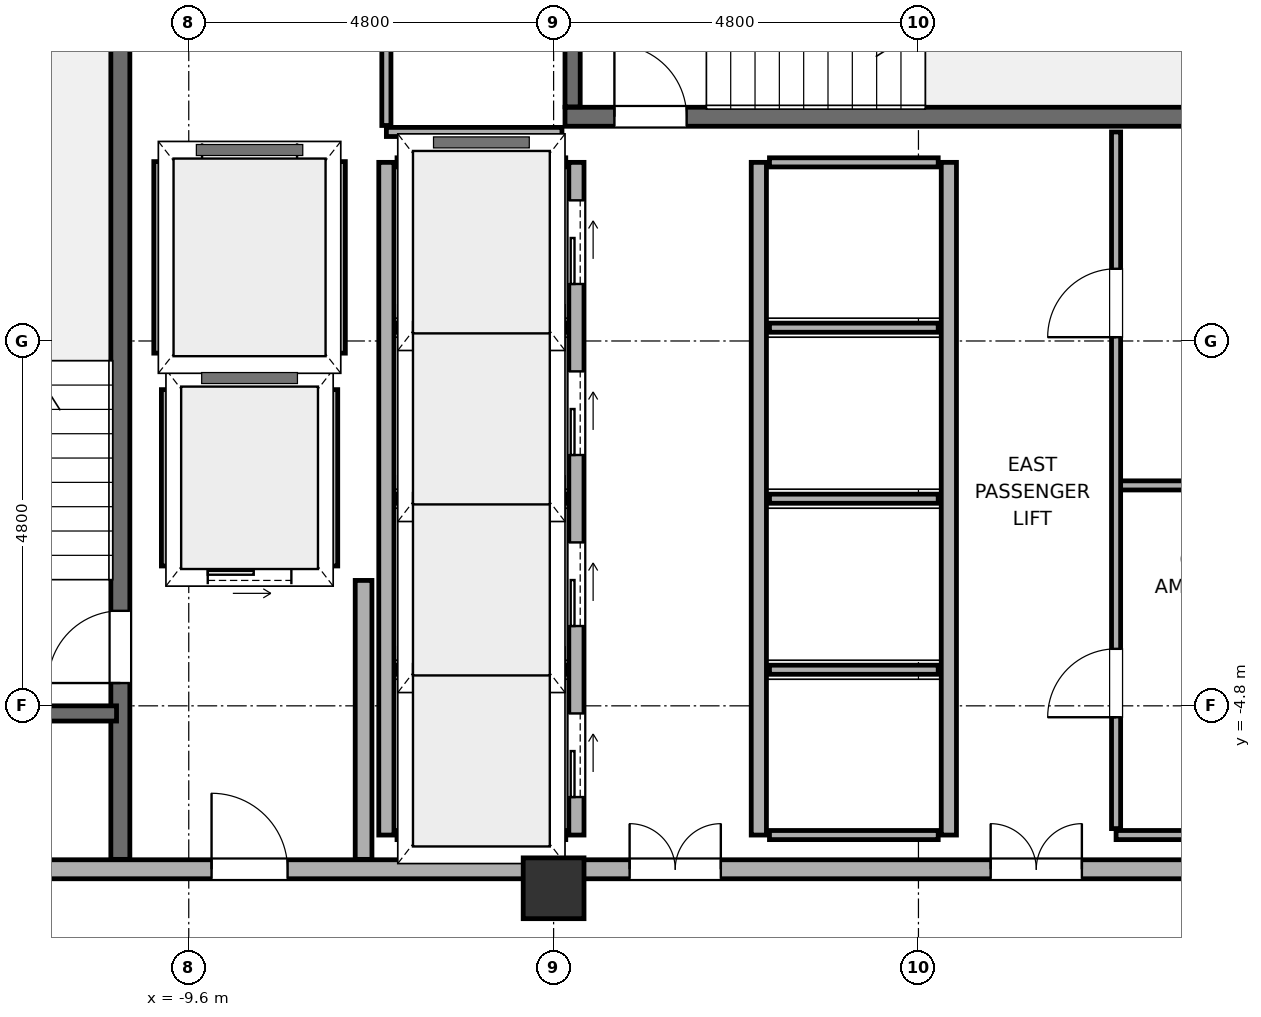
"""IFC4 building model, lengths in metres.
Left out: names, types, materials, properties, quantities, classifications, styles, units other than length and angle.
Written with IfcOpenShell. Run it as: python <this file> out.ifc"""

import sys

from ifc_helpers import new_model, si_unit, direction, frame, frame_2d, origin, origin_2d, place, context, subcontext, project, spatial, rectangle, hollow_rectangle, extrude, element, fill, save


model = new_model("IFC4")
c1 = context("Model", 3, precision=1e-05, world=origin(), true_north=direction((0.0, 1.0)))
c2 = subcontext(c1, "Body", "Model", "MODEL_VIEW")
j1 = project(units=[si_unit("LENGTHUNIT", "METRE"), si_unit("PLANEANGLEUNIT", "RADIAN")], contexts=[c1])
p1 = place(None, origin())
s1 = spatial("IfcSite", under=j1, at=p1, CompositionType="ELEMENT")
p2 = place(p1, origin())
s2 = spatial("IfcBuilding", under=s1, at=p2, CompositionType="ELEMENT")
p3 = place(p2, frame((0.0, 0.0, 30.0)))
s3 = spatial("IfcBuildingStorey", under=s2, at=p3, CompositionType="ELEMENT", Elevation=30.0)
p4 = place(p3, frame((-4.8, -7.2, 0.0), z_axis=(0.0, 0.0, 1.0), x_axis=(1.0, 0.0, 0.0)))
e1 = element("IfcColumn", 1, at=p4, inside=s3, PredefinedType="COLUMN", context=c2, shape_type="SweptSolid", body=[
    extrude(hollow_rectangle(XDim=0.8, YDim=0.8, WallThickness=0.036, at=origin_2d()), origin(), (0.0, 0.0, 1.0), 3.7),
])
p5 = place(p3, frame((-14.2, -6.95, 0.0), z_axis=(0.0, 0.0, 1.0), x_axis=(1.0, 0.0, 0.0)))
e2 = element("IfcWall", 2, at=p5, inside=s3, PredefinedType="SOLIDWALL", context=c2, shape_type="SweptSolid", body=[
    extrude(rectangle(XDim=9.4, YDim=0.25, at=frame_2d((4.7, 0.0))), origin(), (0.0, 0.0, 1.0), 2.12),
])
p6 = place(p5, frame((4.9, 0.0, 0.0)))
e3 = element("IfcOpeningElement", 3, at=p6, cuts=e2, PredefinedType="OPENING", context=c2, shape_type="SweptSolid", body=[
    extrude(rectangle(XDim=1.0, YDim=2.02, at=frame_2d((0.5, 1.01))), frame((0.0, 0.14, 0.0), z_axis=(0.0, -1.0, 0.0), x_axis=(1.0, 0.0, 0.0)), (0.0, 0.0, 1.0), 0.28),
])
p7 = place(p3, frame((-4.6, -6.95, 0.0), z_axis=(0.0, 0.0, 1.0), x_axis=(1.0, 0.0, 0.0)))
e4 = element("IfcWall", 4, at=p7, inside=s3, PredefinedType="SOLIDWALL", context=c2, shape_type="SweptSolid", body=[
    extrude(rectangle(XDim=9.2, YDim=0.25, at=frame_2d((4.6, 0.0))), origin(), (0.0, 0.0, 1.0), 2.32),
])
p8 = place(p7, frame((0.8, 0.0, 0.0)))
e5 = element("IfcOpeningElement", 5, at=p8, cuts=e4, PredefinedType="OPENING", context=c2, shape_type="SweptSolid", body=[
    extrude(rectangle(XDim=1.2, YDim=2.2, at=frame_2d((0.6, 1.1))), frame((0.0, 0.14, 0.0), z_axis=(0.0, -1.0, 0.0), x_axis=(1.0, 0.0, 0.0)), (0.0, 0.0, 1.0), 0.28),
])
p9 = place(p7, frame((5.55, 0.0, 0.0)))
e6 = element("IfcOpeningElement", 6, at=p9, cuts=e4, PredefinedType="OPENING", context=c2, shape_type="SweptSolid", body=[
    extrude(rectangle(XDim=1.2, YDim=2.2, at=frame_2d((0.6, 1.1))), frame((0.0, 0.14, 0.0), z_axis=(0.0, -1.0, 0.0), x_axis=(1.0, 0.0, 0.0)), (0.0, 0.0, 1.0), 0.28),
])
p10 = place(p3, frame((-7.3, -6.82, 0.0), z_axis=(0.0, 0.0, 1.0), x_axis=(0.0, 1.0, 0.0)))
e7 = element("IfcWall", 7, at=p10, inside=s3, PredefinedType="SOLIDWALL", context=c2, shape_type="SweptSolid", body=[
    extrude(rectangle(XDim=3.67, YDim=0.22, at=frame_2d((1.835, 0.0))), origin(), (0.0, 0.0, 1.0), 2.12),
])
p11 = place(p3, frame((-10.5, -6.82, -0.18), z_axis=(0.0, 0.0, 1.0), x_axis=(0.0, 1.0, 0.0)))
e8 = element("IfcWall", 8, at=p11, inside=s3, PredefinedType="SOLIDWALL", context=c2, shape_type="SweptSolid", body=[
    extrude(rectangle(XDim=13.64, YDim=0.25, at=frame_2d((6.82, 0.0))), origin(), (0.0, 0.0, 1.0), 3.7),
])
p12 = place(p11, frame((2.32, 0.0, 0.18)))
e9 = element("IfcOpeningElement", 9, at=p12, cuts=e8, PredefinedType="OPENING", context=c2, shape_type="SweptSolid", body=[
    extrude(rectangle(XDim=0.95, YDim=2.15, at=frame_2d((0.475, 1.075))), frame((0.0, 0.14, 0.0), z_axis=(0.0, -1.0, 0.0), x_axis=(1.0, 0.0, 0.0)), (0.0, 0.0, 1.0), 0.28),
])
p13 = place(p3, frame((-14.2, -4.9, -0.18), z_axis=(0.0, 0.0, 1.0), x_axis=(1.0, 0.0, 0.0)))
e10 = element("IfcWall", 10, at=p13, inside=s3, PredefinedType="SOLIDWALL", context=c2, shape_type="SweptSolid", body=[
    extrude(rectangle(XDim=3.65, YDim=0.2, at=frame_2d((1.825, 0.0))), origin(), (0.0, 0.0, 1.0), 3.7),
])
p14 = place(p3, frame((-4.65, 2.95, -0.18), z_axis=(0.0, 0.0, 1.0), x_axis=(1.0, 0.0, 0.0)))
e11 = element("IfcWall", 11, at=p14, inside=s3, PredefinedType="SOLIDWALL", context=c2, shape_type="SweptSolid", body=[
    extrude(rectangle(XDim=9.9, YDim=0.25, at=frame_2d((4.95, 0.0))), origin(), (0.0, 0.0, 1.0), 3.7),
])
p15 = place(p14, frame((0.65, 0.0, 0.18)))
e12 = element("IfcOpeningElement", 12, at=p15, cuts=e11, PredefinedType="OPENING", context=c2, shape_type="SweptSolid", body=[
    extrude(rectangle(XDim=0.95, YDim=2.15, at=frame_2d((0.475, 1.075))), frame((0.0, 0.14, 0.0), z_axis=(0.0, -1.0, 0.0), x_axis=(1.0, 0.0, 0.0)), (0.0, 0.0, 1.0), 0.28),
])
p16 = place(p3, frame((-4.55, 3.08, -0.18), z_axis=(0.0, 0.0, 1.0), x_axis=(0.0, 1.0, 0.0)))
e13 = element("IfcWall", 13, at=p16, inside=s3, PredefinedType="SOLIDWALL", context=c2, shape_type="SweptSolid", body=[
    extrude(rectangle(XDim=3.74, YDim=0.2, at=frame_2d((1.87, 0.0))), origin(), (0.0, 0.0, 1.0), 3.7),
])
p17 = place(p3, frame((-4.5, -6.5, 0.0), z_axis=(0.0, 0.0, 1.0), x_axis=(0.0, 1.0, 0.0)))
e14 = element("IfcWall", 14, at=p17, inside=s3, PredefinedType="SOLIDWALL", context=c2, shape_type="SweptSolid", body=[
    extrude(rectangle(XDim=8.85, YDim=0.2, at=frame_2d((4.425, 0.0))), origin(), (0.0, 0.0, 1.0), 3.52),
])
p18 = place(p17, frame((0.5, 0.0, 0.0)))
e15 = element("IfcOpeningElement", 15, at=p18, cuts=e14, PredefinedType="OPENING", context=c2, shape_type="SweptSolid", body=[
    extrude(rectangle(XDim=1.1, YDim=2.2, at=frame_2d((0.55, 1.1))), frame((0.0, 0.115, 0.0), z_axis=(0.0, -1.0, 0.0), x_axis=(1.0, 0.0, 0.0)), (0.0, 0.0, 1.0), 0.23),
])
p19 = place(p17, frame((2.75, 0.0, 0.0)))
e16 = element("IfcOpeningElement", 16, at=p19, cuts=e14, PredefinedType="OPENING", context=c2, shape_type="SweptSolid", body=[
    extrude(rectangle(XDim=1.1, YDim=2.2, at=frame_2d((0.55, 1.1))), frame((0.0, 0.115, 0.0), z_axis=(0.0, -1.0, 0.0), x_axis=(1.0, 0.0, 0.0)), (0.0, 0.0, 1.0), 0.23),
])
p20 = place(p17, frame((5.0, 0.0, 0.0)))
e17 = element("IfcOpeningElement", 17, at=p20, cuts=e14, PredefinedType="OPENING", context=c2, shape_type="SweptSolid", body=[
    extrude(rectangle(XDim=1.1, YDim=2.2, at=frame_2d((0.55, 1.1))), frame((0.0, 0.115, 0.0), z_axis=(0.0, -1.0, 0.0), x_axis=(1.0, 0.0, 0.0)), (0.0, 0.0, 1.0), 0.23),
])
p21 = place(p17, frame((7.25, 0.0, 0.0)))
e18 = element("IfcOpeningElement", 18, at=p21, cuts=e14, PredefinedType="OPENING", context=c2, shape_type="SweptSolid", body=[
    extrude(rectangle(XDim=1.1, YDim=2.2, at=frame_2d((0.55, 1.1))), frame((0.0, 0.115, 0.0), z_axis=(0.0, -1.0, 0.0), x_axis=(1.0, 0.0, 0.0)), (0.0, 0.0, 1.0), 0.23),
])
p22 = place(p3, frame((-7.0, -6.5, 0.0), z_axis=(0.0, 0.0, 1.0), x_axis=(0.0, 1.0, 0.0)))
e19 = element("IfcWall", 19, at=p22, inside=s3, PredefinedType="SOLIDWALL", context=c2, shape_type="SweptSolid", body=[
    extrude(rectangle(XDim=8.85, YDim=0.2, at=frame_2d((4.425, 0.0))), origin(), (0.0, 0.0, 1.0), 3.52),
])
for number, where, z_axis, x_axis in (
    (20, (-6.86, -6.5, 0.0), (0.0, 0.0, 1.0), (1.0, 0.0, 0.0)),
    (21, (-6.86, -4.325, 0.0), (0.0, 0.0, 1.0), (1.0, 0.0, 0.0)),
    (22, (-6.86, -2.075, 0.0), (0.0, 0.0, 1.0), (1.0, 0.0, 0.0)),
    (23, (-6.86, 0.175, 0.0), (0.0, 0.0, 1.0), (1.0, 0.0, 0.0)),
    (24, (-6.86, 2.35, 0.0), (0.0, 0.0, 1.0), (1.0, 0.0, 0.0)),
):
    element("IfcWall", number, at=place(p3, frame(where, z_axis=z_axis, x_axis=x_axis)), inside=s3, PredefinedType="PARTITIONING", context=c2, shape_type="SweptSolid", body=[
        extrude(rectangle(XDim=2.22, YDim=0.12, at=frame_2d((1.11, 0.0))), origin(), (0.0, 0.0, 1.0), 3.52),
    ])
for number, where, z_axis, x_axis in (
    (25, (-2.1, -6.5, 0.0), (0.0, 0.0, 1.0), (0.0, 1.0, 0.0)),
    (26, (0.4, -6.5, 0.0), (0.0, 0.0, 1.0), (0.0, 1.0, 0.0)),
):
    element("IfcWall", number, at=place(p3, frame(where, z_axis=z_axis, x_axis=x_axis)), inside=s3, PredefinedType="SOLIDWALL", context=c2, shape_type="SweptSolid", body=[
        extrude(rectangle(XDim=8.85, YDim=0.2, at=frame_2d((4.425, 0.0))), origin(), (0.0, 0.0, 1.0), 3.52),
    ])
for number, where, z_axis, x_axis in (
    (27, (-1.96, -6.5, 0.0), (0.0, 0.0, 1.0), (1.0, 0.0, 0.0)),
    (28, (-1.96, -4.325, 0.0), (0.0, 0.0, 1.0), (1.0, 0.0, 0.0)),
    (29, (-1.96, -2.075, 0.0), (0.0, 0.0, 1.0), (1.0, 0.0, 0.0)),
    (30, (-1.96, 0.175, 0.0), (0.0, 0.0, 1.0), (1.0, 0.0, 0.0)),
    (31, (-1.96, 2.35, 0.0), (0.0, 0.0, 1.0), (1.0, 0.0, 0.0)),
):
    element("IfcWall", number, at=place(p3, frame(where, z_axis=z_axis, x_axis=x_axis)), inside=s3, PredefinedType="PARTITIONING", context=c2, shape_type="SweptSolid", body=[
        extrude(rectangle(XDim=2.22, YDim=0.12, at=frame_2d((1.11, 0.0))), origin(), (0.0, 0.0, 1.0), 3.52),
    ])
p23 = place(p3, frame((-9.82, -3.1, 0.0), z_axis=(0.0, 0.0, 1.0), x_axis=(1.0, 0.0, 0.0)))
e32 = element("IfcWall", 32, at=p23, inside=s3, PredefinedType="SOLIDWALL", context=c2, shape_type="SweptSolid", body=[
    extrude(rectangle(XDim=2.04, YDim=0.2, at=frame_2d((1.02, 0.0))), origin(), (0.0, 0.0, 1.0), 3.52),
])
p24 = place(p23, frame((0.47, 0.0, 0.0)))
e33 = element("IfcOpeningElement", 33, at=p24, cuts=e32, PredefinedType="OPENING", context=c2, shape_type="SweptSolid", body=[
    extrude(rectangle(XDim=1.1, YDim=2.2, at=frame_2d((0.55, 1.1))), frame((0.0, 0.115, 0.0), z_axis=(0.0, -1.0, 0.0), x_axis=(1.0, 0.0, 0.0)), (0.0, 0.0, 1.0), 0.23),
])
p25 = place(p3, frame((-9.82, -0.5, 0.0), z_axis=(0.0, 0.0, 1.0), x_axis=(1.0, 0.0, 0.0)))
e34 = element("IfcWall", 34, at=p25, inside=s3, PredefinedType="SOLIDWALL", context=c2, shape_type="SweptSolid", body=[
    extrude(rectangle(XDim=2.04, YDim=0.2, at=frame_2d((1.02, 0.0))), origin(), (0.0, 0.0, 1.0), 3.52),
])
for number, where, z_axis, x_axis in (
    (35, (-9.9, -2.96, 0.0), (0.0, 0.0, 1.0), (0.0, 1.0, 0.0)),
    (36, (-7.7, -2.96, 0.0), (0.0, 0.0, 1.0), (0.0, 1.0, 0.0)),
):
    element("IfcWall", number, at=place(p3, frame(where, z_axis=z_axis, x_axis=x_axis)), inside=s3, PredefinedType="PARTITIONING", context=c2, shape_type="SweptSolid", body=[
        extrude(rectangle(XDim=2.32, YDim=0.12, at=frame_2d((1.16, 0.0))), origin(), (0.0, 0.0, 1.0), 3.52),
    ])
p26 = place(p3, frame((-9.92, 2.5, 0.0), z_axis=(0.0, 0.0, 1.0), x_axis=(1.0, 0.0, 0.0)))
e37 = element("IfcWall", 37, at=p26, inside=s3, PredefinedType="SOLIDWALL", context=c2, shape_type="SweptSolid", body=[
    extrude(rectangle(XDim=2.24, YDim=0.2, at=frame_2d((1.12, 0.0))), origin(), (0.0, 0.0, 1.0), 3.52),
])
p27 = place(p26, frame((0.495, 0.0, 0.0)))
e38 = element("IfcOpeningElement", 38, at=p27, cuts=e37, PredefinedType="OPENING", context=c2, shape_type="SweptSolid", body=[
    extrude(rectangle(XDim=1.25, YDim=2.25, at=frame_2d((0.625, 1.125))), frame((0.0, 0.115, 0.0), z_axis=(0.0, -1.0, 0.0), x_axis=(1.0, 0.0, 0.0)), (0.0, 0.0, 1.0), 0.23),
])
p28 = place(p3, frame((-9.92, -0.3, 0.0), z_axis=(0.0, 0.0, 1.0), x_axis=(1.0, 0.0, 0.0)))
e39 = element("IfcWall", 39, at=p28, inside=s3, PredefinedType="SOLIDWALL", context=c2, shape_type="SweptSolid", body=[
    extrude(rectangle(XDim=2.24, YDim=0.2, at=frame_2d((1.12, 0.0))), origin(), (0.0, 0.0, 1.0), 3.52),
])
for number, where, z_axis, x_axis in (
    (40, (-10.0, -0.16, 0.0), (0.0, 0.0, 1.0), (0.0, 1.0, 0.0)),
    (41, (-7.6, -0.16, 0.0), (0.0, 0.0, 1.0), (0.0, 1.0, 0.0)),
):
    element("IfcWall", number, at=place(p3, frame(where, z_axis=z_axis, x_axis=x_axis)), inside=s3, PredefinedType="PARTITIONING", context=c2, shape_type="SweptSolid", body=[
        extrude(rectangle(XDim=2.52, YDim=0.12, at=frame_2d((1.26, 0.0))), origin(), (0.0, 0.0, 1.0), 3.52),
    ])
for number, where, z_axis, x_axis in (
    (42, (2.6, -6.5, 0.0), (0.0, 0.0, 1.0), (1.0, 0.0, 0.0)),
    (43, (2.6, -1.9, 0.0), (0.0, 0.0, 1.0), (1.0, 0.0, 0.0)),
):
    element("IfcWall", number, at=place(p3, frame(where, z_axis=z_axis, x_axis=x_axis)), inside=s3, PredefinedType="PARTITIONING", context=c2, shape_type="SweptSolid", body=[
        extrude(rectangle(XDim=2.45, YDim=0.12, at=frame_2d((1.225, 0.0))), origin(), (0.0, 0.0, 1.0), 3.52),
    ])
p29 = place(p3, frame((-7.0, 2.75, 0.0), z_axis=(0.0, 0.0, 1.0), x_axis=(1.0, 0.0, 0.0)))
e44 = element("IfcWall", 44, at=p29, inside=s3, PredefinedType="PARTITIONING", context=c2, shape_type="SweptSolid", body=[
    extrude(rectangle(XDim=2.31, YDim=0.12, at=frame_2d((1.155, 0.0))), origin(), (0.0, 0.0, 1.0), 3.52),
])
p30 = place(p3, frame((-7.0, 2.835, 0.0), z_axis=(0.0, 0.0, 1.0), x_axis=(0.0, 1.0, 0.0)))
e45 = element("IfcWall", 45, at=p30, inside=s3, PredefinedType="PARTITIONING", context=c2, shape_type="SweptSolid", body=[
    extrude(rectangle(XDim=3.715, YDim=0.12, at=frame_2d((1.857, 0.0))), origin(), (0.0, 0.0, 1.0), 3.52),
])
p31 = place(p30, frame((1.315, 0.0, 0.0)))
e46 = element("IfcOpeningElement", 46, at=p31, cuts=e45, PredefinedType="OPENING", context=c2, shape_type="SweptSolid", body=[
    extrude(rectangle(XDim=0.9, YDim=2.1, at=frame_2d((0.45, 1.05))), frame((0.0, 0.075, 0.0), z_axis=(0.0, -1.0, 0.0), x_axis=(1.0, 0.0, 0.0)), (0.0, 0.0, 1.0), 0.15),
])
p32 = place(p3, frame((2.6, -6.415, 0.0), z_axis=(0.0, 0.0, 1.0), x_axis=(0.0, 1.0, 0.0)))
e47 = element("IfcWall", 47, at=p32, inside=s3, PredefinedType="PARTITIONING", context=c2, shape_type="SweptSolid", body=[
    extrude(rectangle(XDim=9.165, YDim=0.12, at=frame_2d((4.583, 0.0))), origin(), (0.0, 0.0, 1.0), 3.52),
])
p33 = place(p32, frame((1.465, 0.0, 0.0)))
e48 = element("IfcOpeningElement", 48, at=p33, cuts=e47, PredefinedType="OPENING", context=c2, shape_type="SweptSolid", body=[
    extrude(rectangle(XDim=0.9, YDim=2.1, at=frame_2d((0.45, 1.05))), frame((0.0, 0.075, 0.0), z_axis=(0.0, -1.0, 0.0), x_axis=(1.0, 0.0, 0.0)), (0.0, 0.0, 1.0), 0.15),
])
p34 = place(p32, frame((6.465, 0.0, 0.0)))
e49 = element("IfcOpeningElement", 49, at=p34, cuts=e47, PredefinedType="OPENING", context=c2, shape_type="SweptSolid", body=[
    extrude(rectangle(XDim=0.9, YDim=2.1, at=frame_2d((0.45, 1.05))), frame((0.0, 0.075, 0.0), z_axis=(0.0, -1.0, 0.0), x_axis=(1.0, 0.0, 0.0)), (0.0, 0.0, 1.0), 0.15),
])
p35 = place(p6, origin())
e50 = element("IfcDoor", 50, at=p35, inside=s3, OperationType="SINGLE_SWING_RIGHT", PredefinedType="DOOR", context=c2, shape_type="SweptSolid", body=[
    extrude(rectangle(XDim=1.0, YDim=2.02, at=frame_2d((0.5, 1.01))), frame((0.0, 0.025, 0.0), z_axis=(0.0, -1.0, 0.0), x_axis=(1.0, 0.0, 0.0)), (0.0, 0.0, 1.0), 0.05),
])
fill(e3, e50)
p36 = place(p8, origin())
e51 = element("IfcDoor", 51, at=p36, inside=s3, OperationType="DOUBLE_DOOR_SINGLE_SWING", PredefinedType="DOOR", context=c2, shape_type="SweptSolid", body=[
    extrude(rectangle(XDim=1.2, YDim=2.2, at=frame_2d((0.6, 1.1))), frame((0.0, 0.025, 0.0), z_axis=(0.0, -1.0, 0.0), x_axis=(1.0, 0.0, 0.0)), (0.0, 0.0, 1.0), 0.05),
])
fill(e5, e51)
p37 = place(p9, origin())
e52 = element("IfcDoor", 52, at=p37, inside=s3, OperationType="DOUBLE_DOOR_SINGLE_SWING", PredefinedType="DOOR", context=c2, shape_type="SweptSolid", body=[
    extrude(rectangle(XDim=1.2, YDim=2.2, at=frame_2d((0.6, 1.1))), frame((0.0, 0.025, 0.0), z_axis=(0.0, -1.0, 0.0), x_axis=(1.0, 0.0, 0.0)), (0.0, 0.0, 1.0), 0.05),
])
fill(e6, e52)
p38 = place(p12, origin())
e53 = element("IfcDoor", 53, at=p38, inside=s3, OperationType="SINGLE_SWING_RIGHT", PredefinedType="DOOR", context=c2, shape_type="SweptSolid", body=[
    extrude(rectangle(XDim=0.95, YDim=2.15, at=frame_2d((0.475, 1.075))), frame((0.0, 0.025, 0.0), z_axis=(0.0, -1.0, 0.0), x_axis=(1.0, 0.0, 0.0)), (0.0, 0.0, 1.0), 0.05),
])
fill(e9, e53)
p39 = place(p15, origin())
e54 = element("IfcDoor", 54, at=p39, inside=s3, OperationType="SINGLE_SWING_LEFT", PredefinedType="DOOR", context=c2, shape_type="SweptSolid", body=[
    extrude(rectangle(XDim=0.95, YDim=2.15, at=frame_2d((0.475, 1.075))), frame((0.0, 0.025, 0.0), z_axis=(0.0, -1.0, 0.0), x_axis=(1.0, 0.0, 0.0)), (0.0, 0.0, 1.0), 0.05),
])
fill(e12, e54)
p40 = place(p18, origin())
e55 = element("IfcDoor", 55, at=p40, inside=s3, OperationType="SLIDING_TO_LEFT", PredefinedType="DOOR", context=c2, shape_type="SweptSolid", body=[
    extrude(rectangle(XDim=1.1, YDim=2.2, at=frame_2d((0.55, 1.1))), frame((0.0, 0.025, 0.0), z_axis=(0.0, -1.0, 0.0), x_axis=(1.0, 0.0, 0.0)), (0.0, 0.0, 1.0), 0.05),
])
fill(e15, e55)
p41 = place(p19, origin())
e56 = element("IfcDoor", 56, at=p41, inside=s3, OperationType="SLIDING_TO_LEFT", PredefinedType="DOOR", context=c2, shape_type="SweptSolid", body=[
    extrude(rectangle(XDim=1.1, YDim=2.2, at=frame_2d((0.55, 1.1))), frame((0.0, 0.025, 0.0), z_axis=(0.0, -1.0, 0.0), x_axis=(1.0, 0.0, 0.0)), (0.0, 0.0, 1.0), 0.05),
])
fill(e16, e56)
p42 = place(p20, origin())
e57 = element("IfcDoor", 57, at=p42, inside=s3, OperationType="SLIDING_TO_LEFT", PredefinedType="DOOR", context=c2, shape_type="SweptSolid", body=[
    extrude(rectangle(XDim=1.1, YDim=2.2, at=frame_2d((0.55, 1.1))), frame((0.0, 0.025, 0.0), z_axis=(0.0, -1.0, 0.0), x_axis=(1.0, 0.0, 0.0)), (0.0, 0.0, 1.0), 0.05),
])
fill(e17, e57)
p43 = place(p21, origin())
e58 = element("IfcDoor", 58, at=p43, inside=s3, OperationType="SLIDING_TO_LEFT", PredefinedType="DOOR", context=c2, shape_type="SweptSolid", body=[
    extrude(rectangle(XDim=1.1, YDim=2.2, at=frame_2d((0.55, 1.1))), frame((0.0, 0.025, 0.0), z_axis=(0.0, -1.0, 0.0), x_axis=(1.0, 0.0, 0.0)), (0.0, 0.0, 1.0), 0.05),
])
fill(e18, e58)
p44 = place(p24, origin())
e59 = element("IfcDoor", 59, at=p44, inside=s3, OperationType="SLIDING_TO_LEFT", PredefinedType="DOOR", context=c2, shape_type="SweptSolid", body=[
    extrude(rectangle(XDim=1.1, YDim=2.2, at=frame_2d((0.55, 1.1))), frame((0.0, 0.025, 0.0), z_axis=(0.0, -1.0, 0.0), x_axis=(1.0, 0.0, 0.0)), (0.0, 0.0, 1.0), 0.05),
])
fill(e33, e59)
p45 = place(p27, origin())
e60 = element("IfcDoor", 60, at=p45, inside=s3, OperationType="SLIDING_TO_LEFT", PredefinedType="DOOR", context=c2, shape_type="SweptSolid", body=[
    extrude(rectangle(XDim=1.25, YDim=2.25, at=frame_2d((0.625, 1.125))), frame((0.0, 0.025, 0.0), z_axis=(0.0, -1.0, 0.0), x_axis=(1.0, 0.0, 0.0)), (0.0, 0.0, 1.0), 0.05),
])
fill(e38, e60)
p46 = place(p33, origin())
e61 = element("IfcDoor", 61, at=p46, inside=s3, OperationType="SINGLE_SWING_RIGHT", PredefinedType="DOOR", context=c2, shape_type="SweptSolid", body=[
    extrude(rectangle(XDim=0.9, YDim=2.1, at=frame_2d((0.45, 1.05))), frame((0.0, 0.025, 0.0), z_axis=(0.0, -1.0, 0.0), x_axis=(1.0, 0.0, 0.0)), (0.0, 0.0, 1.0), 0.05),
])
fill(e48, e61)
p47 = place(p34, origin())
e62 = element("IfcDoor", 62, at=p47, inside=s3, OperationType="SINGLE_SWING_LEFT", PredefinedType="DOOR", context=c2, shape_type="SweptSolid", body=[
    extrude(rectangle(XDim=0.9, YDim=2.1, at=frame_2d((0.45, 1.05))), frame((0.0, 0.025, 0.0), z_axis=(0.0, -1.0, 0.0), x_axis=(1.0, 0.0, 0.0)), (0.0, 0.0, 1.0), 0.05),
])
fill(e49, e62)
save(model, sys.argv[1])
